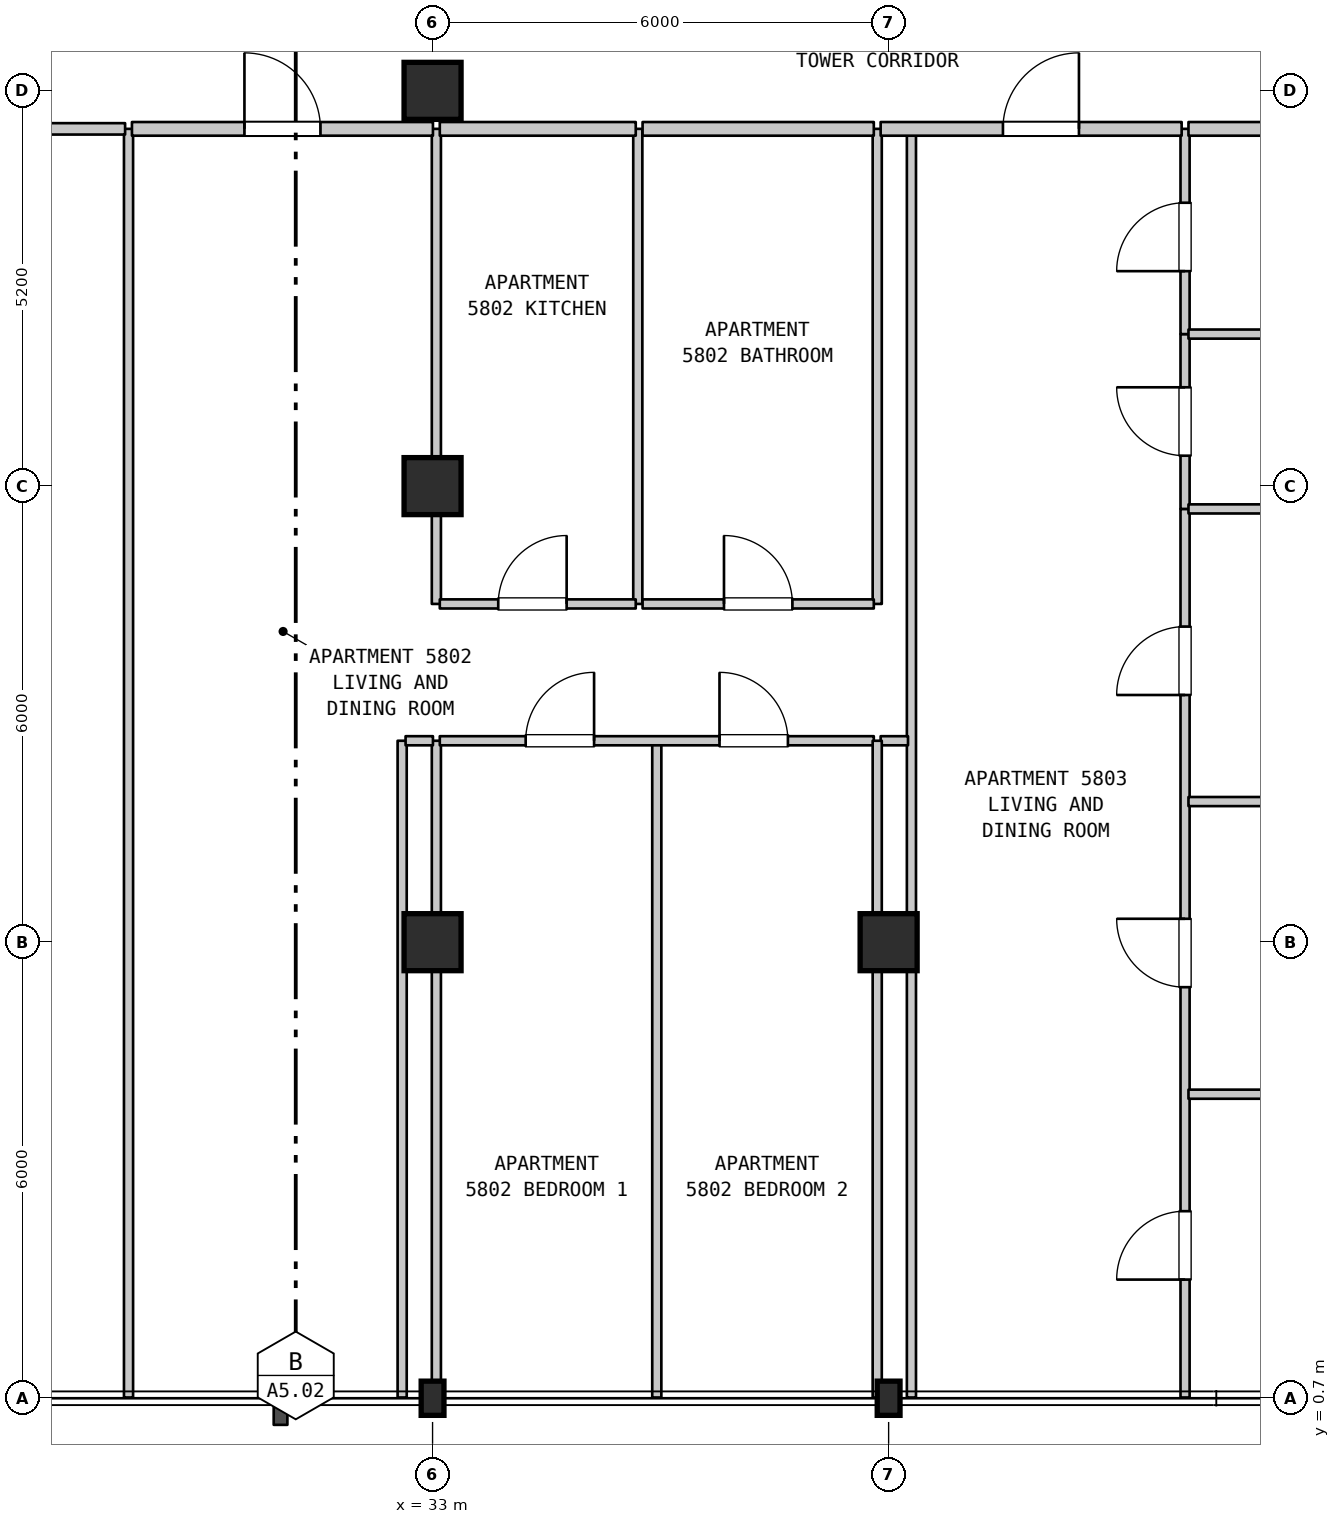
"""IFC4 building model, lengths in metres.
Left out: names, types, materials, properties, quantities, classifications, styles, units other than length and angle.
Written with IfcOpenShell. Run it as: python <this file> out.ifc"""

import sys

from ifc_helpers import new_model, si_unit, direction, frame, frame_2d, origin, origin_2d, place, context, subcontext, project, spatial, rectangle, i_section, extrude, element, fill, save


model = new_model("IFC4")
c1 = context("Model", 3, precision=1e-05, world=origin(), true_north=direction((0.0, 1.0)))
c2 = subcontext(c1, "Body", "Model", "MODEL_VIEW")
j1 = project(units=[si_unit("LENGTHUNIT", "METRE"), si_unit("PLANEANGLEUNIT", "RADIAN")], contexts=[c1])
p1 = place(None, origin())
s1 = spatial("IfcSite", under=j1, at=p1, CompositionType="ELEMENT")
p2 = place(p1, origin())
s2 = spatial("IfcBuilding", under=s1, at=p2, CompositionType="ELEMENT")
p3 = place(p2, frame((0.0, 0.0, 233.9)))
s3 = spatial("IfcBuildingStorey", under=s2, at=p3, CompositionType="ELEMENT", Elevation=233.9)
p4 = place(p3, frame((33.0, 0.7, 0.0), z_axis=(0.0, 0.0, 1.0), x_axis=(1.0, 0.0, 0.0)))
e1 = element("IfcColumn", 1, at=p4, inside=s3, PredefinedType="COLUMN", context=c2, shape_type="SweptSolid", body=[
    extrude(i_section(OverallWidth=0.3, OverallDepth=0.45, WebThickness=0.014, FlangeThickness=0.026, FilletRadius=0.027, at=origin_2d()), origin(), (0.0, 0.0, 1.0), 3.7),
])
for number, where, z_axis, x_axis in (
    (2, (33.0, 6.7, 0.0), (0.0, 0.0, 1.0), (1.0, 0.0, 0.0)),
    (3, (33.0, 12.7, 0.0), (0.0, 0.0, 1.0), (1.0, 0.0, 0.0)),
    (4, (33.0, 17.9, 0.0), (0.0, 0.0, 1.0), (1.0, 0.0, 0.0)),
):
    element("IfcColumn", number, at=place(p3, frame(where, z_axis=z_axis, x_axis=x_axis)), inside=s3, PredefinedType="COLUMN", context=c2, shape_type="SweptSolid", body=[
        extrude(rectangle(XDim=0.75, YDim=0.75, at=origin_2d()), origin(), (0.0, 0.0, 1.0), 3.7),
    ])
p5 = place(p3, frame((39.0, 0.7, 0.0), z_axis=(0.0, 0.0, 1.0), x_axis=(1.0, 0.0, 0.0)))
e5 = element("IfcColumn", 5, at=p5, inside=s3, PredefinedType="COLUMN", context=c2, shape_type="SweptSolid", body=[
    extrude(i_section(OverallWidth=0.3, OverallDepth=0.45, WebThickness=0.014, FlangeThickness=0.026, FilletRadius=0.027, at=origin_2d()), origin(), (0.0, 0.0, 1.0), 3.7),
])
p6 = place(p3, frame((39.0, 6.7, 0.0), z_axis=(0.0, 0.0, 1.0), x_axis=(1.0, 0.0, 0.0)))
e6 = element("IfcColumn", 6, at=p6, inside=s3, PredefinedType="COLUMN", context=c2, shape_type="SweptSolid", body=[
    extrude(rectangle(XDim=0.75, YDim=0.75, at=origin_2d()), origin(), (0.0, 0.0, 1.0), 3.7),
])
p7 = place(p3, frame((29.0, 0.71, 0.0), z_axis=(0.0, 0.0, 1.0), x_axis=(0.0, 1.0, 0.0)))
e7 = element("IfcWall", 7, at=p7, inside=s3, PredefinedType="PARTITIONING", context=c2, shape_type="SweptSolid", body=[
    extrude(rectangle(XDim=16.69, YDim=0.12, at=frame_2d((8.345, 0.0))), origin(), (0.0, 0.0, 1.0), 3.28),
])
p8 = place(p3, frame((32.6, 0.71, 0.0), z_axis=(0.0, 0.0, 1.0), x_axis=(0.0, 1.0, 0.0)))
e8 = element("IfcWall", 8, at=p8, inside=s3, PredefinedType="PARTITIONING", context=c2, shape_type="SweptSolid", body=[
    extrude(rectangle(XDim=8.64, YDim=0.12, at=frame_2d((4.32, 0.0))), origin(), (0.0, 0.0, 1.0), 3.28),
])
p9 = place(p3, frame((33.05, 0.71, 0.0), z_axis=(0.0, 0.0, 1.0), x_axis=(0.0, 1.0, 0.0)))
e9 = element("IfcWall", 9, at=p9, inside=s3, PredefinedType="PARTITIONING", context=c2, shape_type="SweptSolid", body=[
    extrude(rectangle(XDim=8.64, YDim=0.12, at=frame_2d((4.32, 0.0))), origin(), (0.0, 0.0, 1.0), 2.78),
])
p10 = place(p3, frame((33.05, 11.15, 0.0), z_axis=(0.0, 0.0, 1.0), x_axis=(0.0, 1.0, 0.0)))
e10 = element("IfcWall", 10, at=p10, inside=s3, PredefinedType="PARTITIONING", context=c2, shape_type="SweptSolid", body=[
    extrude(rectangle(XDim=6.25, YDim=0.12, at=frame_2d((3.125, 0.0))), origin(), (0.0, 0.0, 1.0), 2.78),
])
p11 = place(p3, frame((35.7, 11.15, 0.0), z_axis=(0.0, 0.0, 1.0), x_axis=(0.0, 1.0, 0.0)))
e11 = element("IfcWall", 11, at=p11, inside=s3, PredefinedType="PARTITIONING", context=c2, shape_type="SweptSolid", body=[
    extrude(rectangle(XDim=6.25, YDim=0.12, at=frame_2d((3.125, 0.0))), origin(), (0.0, 0.0, 1.0), 3.28),
])
p12 = place(p3, frame((35.95, 0.71, 0.0), z_axis=(0.0, 0.0, 1.0), x_axis=(0.0, 1.0, 0.0)))
e12 = element("IfcWall", 12, at=p12, inside=s3, PredefinedType="PARTITIONING", context=c2, shape_type="SweptSolid", body=[
    extrude(rectangle(XDim=8.64, YDim=0.12, at=frame_2d((4.32, 0.0))), origin(), (0.0, 0.0, 1.0), 3.28),
])
p13 = place(p3, frame((38.85, 0.71, 0.0), z_axis=(0.0, 0.0, 1.0), x_axis=(0.0, 1.0, 0.0)))
e13 = element("IfcWall", 13, at=p13, inside=s3, PredefinedType="PARTITIONING", context=c2, shape_type="SweptSolid", body=[
    extrude(rectangle(XDim=5.99, YDim=0.12, at=frame_2d((2.995, 0.0))), origin(), (0.0, 0.0, 1.0), 2.78),
])
p14 = place(p3, frame((38.85, 11.15, 0.0), z_axis=(0.0, 0.0, 1.0), x_axis=(0.0, 1.0, 0.0)))
e14 = element("IfcWall", 14, at=p14, inside=s3, PredefinedType="PARTITIONING", context=c2, shape_type="SweptSolid", body=[
    extrude(rectangle(XDim=6.25, YDim=0.12, at=frame_2d((3.125, 0.0))), origin(), (0.0, 0.0, 1.0), 3.28),
])
p15 = place(p3, frame((39.3, 0.71, 0.0), z_axis=(0.0, 0.0, 1.0), x_axis=(0.0, 1.0, 0.0)))
e15 = element("IfcWall", 15, at=p15, inside=s3, PredefinedType="PARTITIONING", context=c2, shape_type="SweptSolid", body=[
    extrude(rectangle(XDim=16.69, YDim=0.12, at=frame_2d((8.345, 0.0))), origin(), (0.0, 0.0, 1.0), 3.28),
])
p16 = place(p3, frame((42.9, 0.71, 0.0), z_axis=(0.0, 0.0, 1.0), x_axis=(0.0, 1.0, 0.0)))
e16 = element("IfcWall", 16, at=p16, inside=s3, PredefinedType="PARTITIONING", context=c2, shape_type="SweptSolid", body=[
    extrude(rectangle(XDim=11.69, YDim=0.12, at=frame_2d((5.845, 0.0))), origin(), (0.0, 0.0, 1.0), 3.28),
])
p17 = place(p16, frame((1.551, 0.0, 0.0)))
e17 = element("IfcOpeningElement", 17, at=p17, cuts=e16, PredefinedType="OPENING", context=c2, shape_type="SweptSolid", body=[
    extrude(rectangle(XDim=0.9, YDim=2.15, at=frame_2d((0.45, 1.075))), frame((0.0, 0.07, 0.0), z_axis=(0.0, -1.0, 0.0), x_axis=(1.0, 0.0, 0.0)), (0.0, 0.0, 1.0), 0.14),
])
p18 = place(p16, frame((5.398, 0.0, 0.0)))
e18 = element("IfcOpeningElement", 18, at=p18, cuts=e16, PredefinedType="OPENING", context=c2, shape_type="SweptSolid", body=[
    extrude(rectangle(XDim=0.9, YDim=2.15, at=frame_2d((0.45, 1.075))), frame((0.0, 0.07, 0.0), z_axis=(0.0, -1.0, 0.0), x_axis=(1.0, 0.0, 0.0)), (0.0, 0.0, 1.0), 0.14),
])
p19 = place(p16, frame((9.242, 0.0, 0.0)))
e19 = element("IfcOpeningElement", 19, at=p19, cuts=e16, PredefinedType="OPENING", context=c2, shape_type="SweptSolid", body=[
    extrude(rectangle(XDim=0.9, YDim=2.15, at=frame_2d((0.45, 1.075))), frame((0.0, 0.07, 0.0), z_axis=(0.0, -1.0, 0.0), x_axis=(1.0, 0.0, 0.0)), (0.0, 0.0, 1.0), 0.14),
])
p20 = place(p3, frame((42.9, 12.4, 0.0), z_axis=(0.0, 0.0, 1.0), x_axis=(0.0, 1.0, 0.0)))
e20 = element("IfcWall", 20, at=p20, inside=s3, PredefinedType="PARTITIONING", context=c2, shape_type="SweptSolid", body=[
    extrude(rectangle(XDim=2.3, YDim=0.12, at=frame_2d((1.15, 0.0))), origin(), (0.0, 0.0, 1.0), 3.28),
])
p21 = place(p20, frame((0.7, 0.0, 0.0)))
e21 = element("IfcOpeningElement", 21, at=p21, cuts=e20, PredefinedType="OPENING", context=c2, shape_type="SweptSolid", body=[
    extrude(rectangle(XDim=0.9, YDim=2.15, at=frame_2d((0.45, 1.075))), frame((0.0, 0.07, 0.0), z_axis=(0.0, -1.0, 0.0), x_axis=(1.0, 0.0, 0.0)), (0.0, 0.0, 1.0), 0.14),
])
p22 = place(p3, frame((42.9, 14.7, 0.0), z_axis=(0.0, 0.0, 1.0), x_axis=(0.0, 1.0, 0.0)))
e22 = element("IfcWall", 22, at=p22, inside=s3, PredefinedType="PARTITIONING", context=c2, shape_type="SweptSolid", body=[
    extrude(rectangle(XDim=2.7, YDim=0.12, at=frame_2d((1.35, 0.0))), origin(), (0.0, 0.0, 1.0), 3.28),
])
p23 = place(p22, frame((0.828, 0.0, 0.0)))
e23 = element("IfcOpeningElement", 23, at=p23, cuts=e22, PredefinedType="OPENING", context=c2, shape_type="SweptSolid", body=[
    extrude(rectangle(XDim=0.9, YDim=2.1, at=frame_2d((0.45, 1.05))), frame((0.0, 0.07, 0.0), z_axis=(0.0, -1.0, 0.0), x_axis=(1.0, 0.0, 0.0)), (0.0, 0.0, 1.0), 0.14),
])
for number, where, z_axis, x_axis in (
    (24, (42.945, 4.7, 0.0), (0.0, 0.0, 1.0), (1.0, 0.0, 0.0)),
    (25, (42.945, 8.55, 0.0), (0.0, 0.0, 1.0), (1.0, 0.0, 0.0)),
):
    element("IfcWall", number, at=place(p3, frame(where, z_axis=z_axis, x_axis=x_axis)), inside=s3, PredefinedType="PARTITIONING", context=c2, shape_type="SweptSolid", body=[
        extrude(rectangle(XDim=5.78, YDim=0.12, at=frame_2d((2.89, 0.0))), origin(), (0.0, 0.0, 1.0), 3.28),
    ])
p24 = place(p3, frame((32.645, 9.35, 0.0), z_axis=(0.0, 0.0, 1.0), x_axis=(1.0, 0.0, 0.0)))
e26 = element("IfcWall", 26, at=p24, inside=s3, PredefinedType="PARTITIONING", context=c2, shape_type="SweptSolid", body=[
    extrude(rectangle(XDim=0.36, YDim=0.12, at=frame_2d((0.18, 0.0))), origin(), (0.0, 0.0, 1.0), 3.28),
])
p25 = place(p3, frame((33.095, 9.35, 0.0), z_axis=(0.0, 0.0, 1.0), x_axis=(1.0, 0.0, 0.0)))
e27 = element("IfcWall", 27, at=p25, inside=s3, PredefinedType="PARTITIONING", context=c2, shape_type="SweptSolid", body=[
    extrude(rectangle(XDim=5.71, YDim=0.12, at=frame_2d((2.855, 0.0))), origin(), (0.0, 0.0, 1.0), 3.28),
])
p26 = place(p25, frame((1.13, 0.0, 0.0)))
e28 = element("IfcOpeningElement", 28, at=p26, cuts=e27, PredefinedType="OPENING", context=c2, shape_type="SweptSolid", body=[
    extrude(rectangle(XDim=0.9, YDim=2.15, at=frame_2d((0.45, 1.075))), frame((0.0, 0.07, 0.0), z_axis=(0.0, -1.0, 0.0), x_axis=(1.0, 0.0, 0.0)), (0.0, 0.0, 1.0), 0.14),
])
p27 = place(p25, frame((3.68, 0.0, 0.0)))
e29 = element("IfcOpeningElement", 29, at=p27, cuts=e27, PredefinedType="OPENING", context=c2, shape_type="SweptSolid", body=[
    extrude(rectangle(XDim=0.9, YDim=2.15, at=frame_2d((0.45, 1.075))), frame((0.0, 0.07, 0.0), z_axis=(0.0, -1.0, 0.0), x_axis=(1.0, 0.0, 0.0)), (0.0, 0.0, 1.0), 0.14),
])
p28 = place(p3, frame((38.895, 9.35, 0.0), z_axis=(0.0, 0.0, 1.0), x_axis=(1.0, 0.0, 0.0)))
e30 = element("IfcWall", 30, at=p28, inside=s3, PredefinedType="PARTITIONING", context=c2, shape_type="SweptSolid", body=[
    extrude(rectangle(XDim=0.36, YDim=0.12, at=frame_2d((0.18, 0.0))), origin(), (0.0, 0.0, 1.0), 3.28),
])
p29 = place(p3, frame((33.095, 11.15, 0.0), z_axis=(0.0, 0.0, 1.0), x_axis=(1.0, 0.0, 0.0)))
e31 = element("IfcWall", 31, at=p29, inside=s3, PredefinedType="PARTITIONING", context=c2, shape_type="SweptSolid", body=[
    extrude(rectangle(XDim=2.578, YDim=0.12, at=frame_2d((1.289, 0.0))), origin(), (0.0, 0.0, 1.0), 3.28),
])
p30 = place(p29, frame((0.769, 0.0, 0.0)))
e32 = element("IfcOpeningElement", 32, at=p30, cuts=e31, PredefinedType="OPENING", context=c2, shape_type="SweptSolid", body=[
    extrude(rectangle(XDim=0.9, YDim=2.15, at=frame_2d((0.45, 1.075))), frame((0.0, 0.07, 0.0), z_axis=(0.0, -1.0, 0.0), x_axis=(1.0, 0.0, 0.0)), (0.0, 0.0, 1.0), 0.14),
])
p31 = place(p3, frame((35.763, 11.15, 0.0), z_axis=(0.0, 0.0, 1.0), x_axis=(1.0, 0.0, 0.0)))
e33 = element("IfcWall", 33, at=p31, inside=s3, PredefinedType="PARTITIONING", context=c2, shape_type="SweptSolid", body=[
    extrude(rectangle(XDim=3.042, YDim=0.12, at=frame_2d((1.521, 0.0))), origin(), (0.0, 0.0, 1.0), 3.28),
])
p32 = place(p31, frame((1.071, 0.0, 0.0)))
e34 = element("IfcOpeningElement", 34, at=p32, cuts=e33, PredefinedType="OPENING", context=c2, shape_type="SweptSolid", body=[
    extrude(rectangle(XDim=0.9, YDim=2.1, at=frame_2d((0.45, 1.05))), frame((0.0, 0.07, 0.0), z_axis=(0.0, -1.0, 0.0), x_axis=(1.0, 0.0, 0.0)), (0.0, 0.0, 1.0), 0.14),
])
for number, where, z_axis, x_axis in (
    (35, (42.945, 12.4, 0.0), (0.0, 0.0, 1.0), (1.0, 0.0, 0.0)),
    (36, (42.945, 14.7, 0.0), (0.0, 0.0, 1.0), (1.0, 0.0, 0.0)),
):
    element("IfcWall", number, at=place(p3, frame(where, z_axis=z_axis, x_axis=x_axis)), inside=s3, PredefinedType="PARTITIONING", context=c2, shape_type="SweptSolid", body=[
        extrude(rectangle(XDim=5.78, YDim=0.12, at=frame_2d((2.89, 0.0))), origin(), (0.0, 0.0, 1.0), 3.28),
    ])
p33 = place(p3, frame((24.245, 17.4, 0.0), z_axis=(0.0, 0.0, 1.0), x_axis=(1.0, 0.0, 0.0)))
e37 = element("IfcWall", 37, at=p33, inside=s3, PredefinedType="STANDARD", context=c2, shape_type="SweptSolid", body=[
    extrude(rectangle(XDim=4.71, YDim=0.15, at=frame_2d((2.355, 0.0))), origin(), (0.0, 0.0, 1.0), 3.28),
])
p34 = place(p33, frame((1.782, 0.0, 0.0)))
e38 = element("IfcOpeningElement", 38, at=p34, cuts=e37, PredefinedType="OPENING", context=c2, shape_type="SweptSolid", body=[
    extrude(rectangle(XDim=1.0, YDim=2.15, at=frame_2d((0.5, 1.075))), frame((0.0, 0.085, 0.0), z_axis=(0.0, -1.0, 0.0), x_axis=(1.0, 0.0, 0.0)), (0.0, 0.0, 1.0), 0.17),
])
p35 = place(p3, frame((29.045, 17.4, 0.0), z_axis=(0.0, 0.0, 1.0), x_axis=(1.0, 0.0, 0.0)))
e39 = element("IfcWall", 39, at=p35, inside=s3, PredefinedType="STANDARD", context=c2, shape_type="SweptSolid", body=[
    extrude(rectangle(XDim=3.96, YDim=0.18, at=frame_2d((1.98, 0.0))), origin(), (0.0, 0.0, 1.0), 3.28),
])
p36 = place(p35, frame((1.48, 0.0, 0.0)))
e40 = element("IfcOpeningElement", 40, at=p36, cuts=e39, PredefinedType="OPENING", context=c2, shape_type="SweptSolid", body=[
    extrude(rectangle(XDim=1.0, YDim=2.15, at=frame_2d((0.5, 1.075))), frame((0.0, 0.1, 0.0), z_axis=(0.0, -1.0, 0.0), x_axis=(1.0, 0.0, 0.0)), (0.0, 0.0, 1.0), 0.2),
])
p37 = place(p3, frame((33.095, 17.4, 0.0), z_axis=(0.0, 0.0, 1.0), x_axis=(1.0, 0.0, 0.0)))
e41 = element("IfcWall", 41, at=p37, inside=s3, PredefinedType="STANDARD", context=c2, shape_type="SweptSolid", body=[
    extrude(rectangle(XDim=2.578, YDim=0.18, at=frame_2d((1.289, 0.0))), origin(), (0.0, 0.0, 1.0), 3.28),
])
p38 = place(p3, frame((35.763, 17.4, 0.0), z_axis=(0.0, 0.0, 1.0), x_axis=(1.0, 0.0, 0.0)))
e42 = element("IfcWall", 42, at=p38, inside=s3, PredefinedType="STANDARD", context=c2, shape_type="SweptSolid", body=[
    extrude(rectangle(XDim=3.042, YDim=0.18, at=frame_2d((1.521, 0.0))), origin(), (0.0, 0.0, 1.0), 3.28),
])
p39 = place(p3, frame((38.895, 17.4, 0.0), z_axis=(0.0, 0.0, 1.0), x_axis=(1.0, 0.0, 0.0)))
e43 = element("IfcWall", 43, at=p39, inside=s3, PredefinedType="STANDARD", context=c2, shape_type="SweptSolid", body=[
    extrude(rectangle(XDim=3.96, YDim=0.18, at=frame_2d((1.98, 0.0))), origin(), (0.0, 0.0, 1.0), 3.28),
])
p40 = place(p39, frame((1.609, 0.0, 0.0)))
e44 = element("IfcOpeningElement", 44, at=p40, cuts=e43, PredefinedType="OPENING", context=c2, shape_type="SweptSolid", body=[
    extrude(rectangle(XDim=1.0, YDim=2.15, at=frame_2d((0.5, 1.075))), frame((0.0, 0.1, 0.0), z_axis=(0.0, -1.0, 0.0), x_axis=(1.0, 0.0, 0.0)), (0.0, 0.0, 1.0), 0.2),
])
p41 = place(p3, frame((42.945, 17.4, 0.0), z_axis=(0.0, 0.0, 1.0), x_axis=(1.0, 0.0, 0.0)))
e45 = element("IfcWall", 45, at=p41, inside=s3, PredefinedType="STANDARD", context=c2, shape_type="SweptSolid", body=[
    extrude(rectangle(XDim=5.78, YDim=0.18, at=frame_2d((2.89, 0.0))), origin(), (0.0, 0.0, 1.0), 3.28),
])
p42 = place(p3, frame((38.85, 6.7, 0.0), z_axis=(0.0, 0.0, 1.0), x_axis=(0.0, 1.0, 0.0)))
e46 = element("IfcWall", 46, at=p42, inside=s3, PredefinedType="PARTITIONING", context=c2, shape_type="SweptSolid", body=[
    extrude(rectangle(XDim=2.65, YDim=0.12, at=frame_2d((1.325, 0.0))), origin(), (0.0, 0.0, 1.0), 3.28),
])
p43 = place(p17, origin())
e47 = element("IfcDoor", 47, at=p43, inside=s3, OperationType="SINGLE_SWING_LEFT", PredefinedType="DOOR", context=c2, shape_type="SweptSolid", body=[
    extrude(rectangle(XDim=0.9, YDim=2.15, at=frame_2d((0.45, 1.075))), frame((0.0, 0.025, 0.0), z_axis=(0.0, -1.0, 0.0), x_axis=(1.0, 0.0, 0.0)), (0.0, 0.0, 1.0), 0.05),
])
fill(e17, e47)
p44 = place(p18, origin())
e48 = element("IfcDoor", 48, at=p44, inside=s3, OperationType="SINGLE_SWING_RIGHT", PredefinedType="DOOR", context=c2, shape_type="SweptSolid", body=[
    extrude(rectangle(XDim=0.9, YDim=2.15, at=frame_2d((0.45, 1.075))), frame((0.0, 0.025, 0.0), z_axis=(0.0, -1.0, 0.0), x_axis=(1.0, 0.0, 0.0)), (0.0, 0.0, 1.0), 0.05),
])
fill(e18, e48)
p45 = place(p19, origin())
e49 = element("IfcDoor", 49, at=p45, inside=s3, OperationType="SINGLE_SWING_LEFT", PredefinedType="DOOR", context=c2, shape_type="SweptSolid", body=[
    extrude(rectangle(XDim=0.9, YDim=2.15, at=frame_2d((0.45, 1.075))), frame((0.0, 0.025, 0.0), z_axis=(0.0, -1.0, 0.0), x_axis=(1.0, 0.0, 0.0)), (0.0, 0.0, 1.0), 0.05),
])
fill(e19, e49)
p46 = place(p21, origin())
e50 = element("IfcDoor", 50, at=p46, inside=s3, OperationType="SINGLE_SWING_RIGHT", PredefinedType="DOOR", context=c2, shape_type="SweptSolid", body=[
    extrude(rectangle(XDim=0.9, YDim=2.15, at=frame_2d((0.45, 1.075))), frame((0.0, 0.025, 0.0), z_axis=(0.0, -1.0, 0.0), x_axis=(1.0, 0.0, 0.0)), (0.0, 0.0, 1.0), 0.05),
])
fill(e21, e50)
p47 = place(p23, origin())
e51 = element("IfcDoor", 51, at=p47, inside=s3, OperationType="SINGLE_SWING_LEFT", PredefinedType="DOOR", context=c2, shape_type="SweptSolid", body=[
    extrude(rectangle(XDim=0.9, YDim=2.1, at=frame_2d((0.45, 1.05))), frame((0.0, 0.025, 0.0), z_axis=(0.0, -1.0, 0.0), x_axis=(1.0, 0.0, 0.0)), (0.0, 0.0, 1.0), 0.05),
])
fill(e23, e51)
p48 = place(p26, origin())
e52 = element("IfcDoor", 52, at=p48, inside=s3, OperationType="SINGLE_SWING_RIGHT", PredefinedType="DOOR", context=c2, shape_type="SweptSolid", body=[
    extrude(rectangle(XDim=0.9, YDim=2.15, at=frame_2d((0.45, 1.075))), frame((0.0, 0.025, 0.0), z_axis=(0.0, -1.0, 0.0), x_axis=(1.0, 0.0, 0.0)), (0.0, 0.0, 1.0), 0.05),
])
fill(e28, e52)
p49 = place(p27, origin())
e53 = element("IfcDoor", 53, at=p49, inside=s3, OperationType="SINGLE_SWING_LEFT", PredefinedType="DOOR", context=c2, shape_type="SweptSolid", body=[
    extrude(rectangle(XDim=0.9, YDim=2.15, at=frame_2d((0.45, 1.075))), frame((0.0, 0.025, 0.0), z_axis=(0.0, -1.0, 0.0), x_axis=(1.0, 0.0, 0.0)), (0.0, 0.0, 1.0), 0.05),
])
fill(e29, e53)
p50 = place(p30, origin())
e54 = element("IfcDoor", 54, at=p50, inside=s3, OperationType="SINGLE_SWING_RIGHT", PredefinedType="DOOR", context=c2, shape_type="SweptSolid", body=[
    extrude(rectangle(XDim=0.9, YDim=2.15, at=frame_2d((0.45, 1.075))), frame((0.0, 0.025, 0.0), z_axis=(0.0, -1.0, 0.0), x_axis=(1.0, 0.0, 0.0)), (0.0, 0.0, 1.0), 0.05),
])
fill(e32, e54)
p51 = place(p32, origin())
e55 = element("IfcDoor", 55, at=p51, inside=s3, OperationType="SINGLE_SWING_LEFT", PredefinedType="DOOR", context=c2, shape_type="SweptSolid", body=[
    extrude(rectangle(XDim=0.9, YDim=2.1, at=frame_2d((0.45, 1.05))), frame((0.0, 0.025, 0.0), z_axis=(0.0, -1.0, 0.0), x_axis=(1.0, 0.0, 0.0)), (0.0, 0.0, 1.0), 0.05),
])
fill(e34, e55)
p52 = place(p36, origin())
e56 = element("IfcDoor", 56, at=p52, inside=s3, OperationType="SINGLE_SWING_LEFT", PredefinedType="DOOR", context=c2, shape_type="SweptSolid", body=[
    extrude(rectangle(XDim=1.0, YDim=2.15, at=frame_2d((0.5, 1.075))), frame((0.0, 0.025, 0.0), z_axis=(0.0, -1.0, 0.0), x_axis=(1.0, 0.0, 0.0)), (0.0, 0.0, 1.0), 0.05),
])
fill(e40, e56)
p53 = place(p40, origin())
e57 = element("IfcDoor", 57, at=p53, inside=s3, OperationType="SINGLE_SWING_RIGHT", PredefinedType="DOOR", context=c2, shape_type="SweptSolid", body=[
    extrude(rectangle(XDim=1.0, YDim=2.15, at=frame_2d((0.5, 1.075))), frame((0.0, 0.025, 0.0), z_axis=(0.0, -1.0, 0.0), x_axis=(1.0, 0.0, 0.0)), (0.0, 0.0, 1.0), 0.05),
])
fill(e44, e57)
save(model, sys.argv[1])
